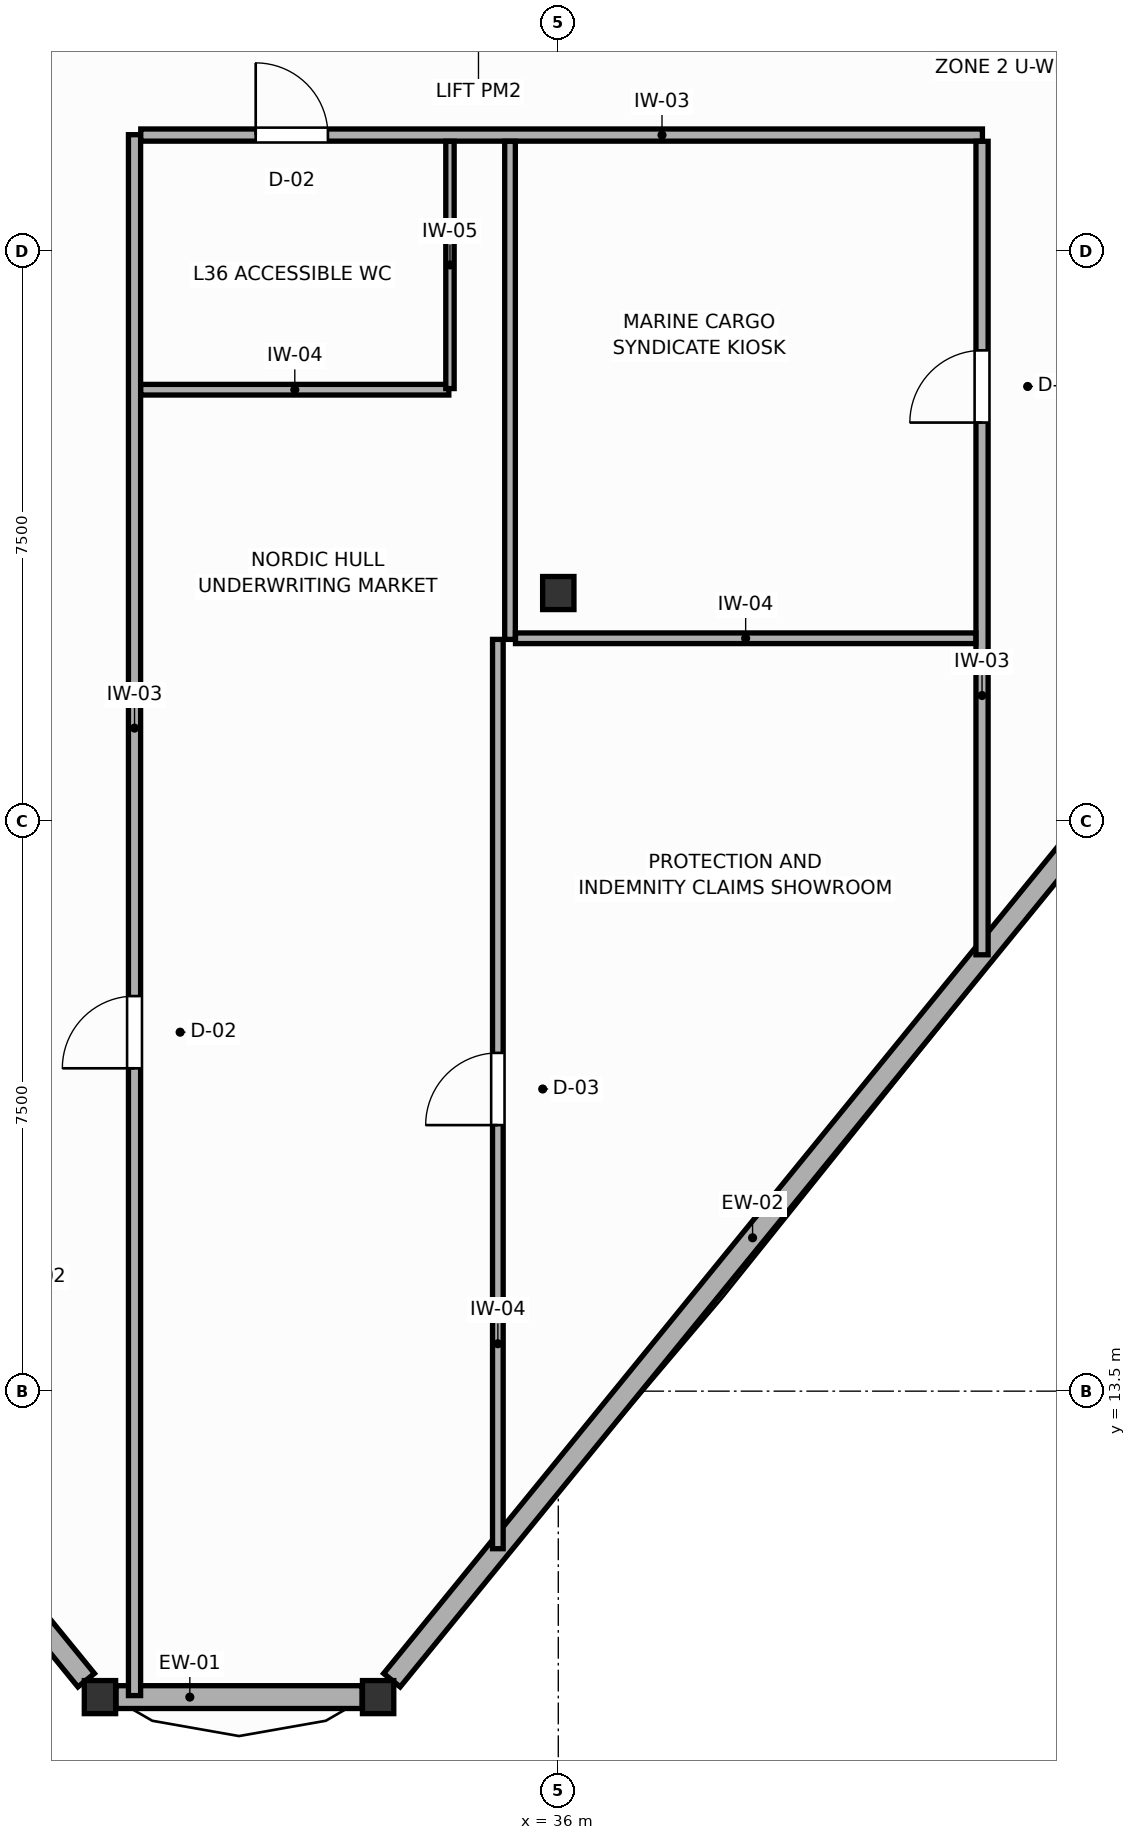
"""IFC4 building model, lengths in metres.
Left out: names, types, materials, properties, quantities, classifications, styles, units other than length and angle.
Written with IfcOpenShell. Run it as: python <this file> out.ifc"""

import sys

from ifc_helpers import new_model, si_unit, direction, frame, frame_2d, origin, origin_2d, place, context, subcontext, project, spatial, rectangle, i_section, extrude, source, transform, mapped, element, fill, save


model = new_model("IFC4")
c1 = context("Model", 3, precision=1e-05, world=origin(), true_north=direction((0.0, 1.0)))
c2 = subcontext(c1, "Body", "Model", "MODEL_VIEW")
j1 = project(units=[si_unit("LENGTHUNIT", "METRE"), si_unit("PLANEANGLEUNIT", "RADIAN")], contexts=[c1])
p1 = place(None, origin())
s1 = spatial("IfcSite", under=j1, at=p1, CompositionType="ELEMENT")
p2 = place(p1, origin())
s2 = spatial("IfcBuilding", under=s1, at=p2, CompositionType="ELEMENT")
p3 = place(p2, frame((0.0, 0.0, 143.4)))
s3 = spatial("IfcBuildingStorey", under=s2, at=p3, CompositionType="ELEMENT", Elevation=143.4)
m1 = source(origin(), c2, "Body", "SweptSolid", [
    extrude(i_section(OverallWidth=0.412, OverallDepth=0.435, WebThickness=0.033, FlangeThickness=0.053, FilletRadius=0.015, at=origin_2d()), origin(), (0.0, 0.0, 1.0), 3.6),
])
for number, where, z_axis, x_axis in (
    (1, (36.0, 24.0, 0.0), (0.0, 0.0, 1.0), (1.0, 0.0, 0.0)),
    (2, (29.97, 9.475, 0.0), (0.0, 0.0, 1.0), (1.0, 0.0, 0.0)),
    (3, (33.63, 9.475, 0.0), (0.0, 0.0, 1.0), (1.0, 0.0, 0.0)),
):
    element("IfcColumn", number, at=place(p3, frame(where, z_axis=z_axis, x_axis=x_axis)), inside=s3, PredefinedType="COLUMN", context=c2, shape_type="MappedRepresentation", body=[
        mapped(m1, transform((0.0, 0.0, 0.0), scale=1.0)),
    ])
p4 = place(p3, frame((20.299, 21.338, 0.0), z_axis=(0.0, 0.0, 1.0), x_axis=(0.631872666528, -0.775072211665, 0.0)))
e4 = element("IfcWall", 4, at=p4, inside=s3, PredefinedType="SOLIDWALL", context=c2, shape_type="SweptSolid", body=[
    extrude(rectangle(XDim=15.019, YDim=0.28, at=frame_2d((7.509, 0.0))), origin(), (0.0, 0.0, 1.0), 1.87),
])
p5 = place(p3, frame((30.181, 9.475, 0.0), z_axis=(0.0, 0.0, 1.0), x_axis=(1.0, 0.0, 0.0)))
e5 = element("IfcWall", 5, at=p5, inside=s3, PredefinedType="SOLIDWALL", context=c2, shape_type="SweptSolid", body=[
    extrude(rectangle(XDim=3.237, YDim=0.3, at=frame_2d((1.619, 0.0))), origin(), (0.0, 0.0, 1.0), 1.87),
])
p6 = place(p3, frame((33.811, 9.698, 0.0), z_axis=(0.0, 0.0, 1.0), x_axis=(0.631882431987, 0.775064250334, 0.0)))
e6 = element("IfcWall", 6, at=p6, inside=s3, PredefinedType="SOLIDWALL", context=c2, shape_type="SweptSolid", body=[
    extrude(rectangle(XDim=15.019, YDim=0.28, at=frame_2d((7.509, 0.0))), origin(), (0.0, 0.0, 1.0), 1.87),
])
p7 = place(p3, frame((30.425, 9.495, 0.0), z_axis=(0.0, 0.0, 1.0), x_axis=(0.0, 1.0, 0.0)))
e7 = element("IfcWall", 7, at=p7, inside=s3, PredefinedType="PARTITIONING", context=c2, shape_type="SweptSolid", body=[
    extrude(rectangle(XDim=20.535, YDim=0.16, at=frame_2d((10.268, 0.0))), origin(), (0.0, 0.0, 1.0), 3.4),
])
p8 = place(p7, frame((8.252, 0.0, 0.0)))
e8 = element("IfcOpeningElement", 8, at=p8, cuts=e7, PredefinedType="OPENING", context=c2, shape_type="SweptSolid", body=[
    extrude(rectangle(XDim=0.95, YDim=2.05, at=frame_2d((0.475, 1.025))), frame((0.0, 0.09, 0.0), z_axis=(0.0, -1.0, 0.0), x_axis=(1.0, 0.0, 0.0)), (0.0, 0.0, 1.0), 0.18),
])
p9 = place(p3, frame((30.507, 30.025, 0.0), z_axis=(0.0, 0.0, 1.0), x_axis=(1.0, 0.0, 0.0)))
e9 = element("IfcWall", 9, at=p9, inside=s3, PredefinedType="PARTITIONING", context=c2, shape_type="SweptSolid", body=[
    extrude(rectangle(XDim=11.073, YDim=0.16, at=frame_2d((5.537, 0.0))), origin(), (0.0, 0.0, 1.0), 3.4),
])
p10 = place(p9, frame((1.512, 0.0, 0.0)))
e10 = element("IfcOpeningElement", 10, at=p10, cuts=e9, PredefinedType="OPENING", context=c2, shape_type="SweptSolid", body=[
    extrude(rectangle(XDim=0.95, YDim=2.05, at=frame_2d((0.475, 1.025))), frame((0.0, 0.09, 0.0), z_axis=(0.0, -1.0, 0.0), x_axis=(1.0, 0.0, 0.0)), (0.0, 0.0, 1.0), 0.18),
])
p11 = place(p3, frame((41.575, 19.241, 0.0), z_axis=(0.0, 0.0, 1.0), x_axis=(0.0, 1.0, 0.0)))
e11 = element("IfcWall", 11, at=p11, inside=s3, PredefinedType="PARTITIONING", context=c2, shape_type="SweptSolid", body=[
    extrude(rectangle(XDim=10.702, YDim=0.16, at=frame_2d((5.351, 0.0))), origin(), (0.0, 0.0, 1.0), 3.4),
])
p12 = place(p11, frame((7.002, 0.0, 0.0)))
e12 = element("IfcOpeningElement", 12, at=p12, cuts=e11, PredefinedType="OPENING", context=c2, shape_type="SweptSolid", body=[
    extrude(rectangle(XDim=0.95, YDim=2.05, at=frame_2d((0.475, 1.025))), frame((0.0, 0.09, 0.0), z_axis=(0.0, -1.0, 0.0), x_axis=(1.0, 0.0, 0.0)), (0.0, 0.0, 1.0), 0.18),
])
p13 = place(p3, frame((35.205, 11.427, 0.0), z_axis=(0.0, 0.0, 1.0), x_axis=(0.0, 1.0, 0.0)))
e13 = element("IfcWall", 13, at=p13, inside=s3, PredefinedType="PARTITIONING", context=c2, shape_type="SweptSolid", body=[
    extrude(rectangle(XDim=11.963, YDim=0.14, at=frame_2d((5.981, 0.0))), origin(), (0.0, 0.0, 1.0), 3.4),
])
p14 = place(p13, frame((5.573, 0.0, 0.0)))
e14 = element("IfcOpeningElement", 14, at=p14, cuts=e13, PredefinedType="OPENING", context=c2, shape_type="SweptSolid", body=[
    extrude(rectangle(XDim=0.95, YDim=2.05, at=frame_2d((0.475, 1.025))), frame((0.0, 0.08, 0.0), z_axis=(0.0, -1.0, 0.0), x_axis=(1.0, 0.0, 0.0)), (0.0, 0.0, 1.0), 0.16),
])
p15 = place(p3, frame((35.365, 23.39, 0.0), z_axis=(0.0, 0.0, 1.0), x_axis=(0.0, 1.0, 0.0)))
e15 = element("IfcWall", 15, at=p15, inside=s3, PredefinedType="PARTITIONING", context=c2, shape_type="SweptSolid", body=[
    extrude(rectangle(XDim=6.553, YDim=0.14, at=frame_2d((3.277, 0.0))), origin(), (0.0, 0.0, 1.0), 3.4),
])
p16 = place(p3, frame((35.437, 23.405, 0.0), z_axis=(0.0, 0.0, 1.0), x_axis=(1.0, 0.0, 0.0)))
e16 = element("IfcWall", 16, at=p16, inside=s3, PredefinedType="PARTITIONING", context=c2, shape_type="SweptSolid", body=[
    extrude(rectangle(XDim=6.056, YDim=0.14, at=frame_2d((3.028, 0.0))), origin(), (0.0, 0.0, 1.0), 3.4),
])
p17 = place(p3, frame((30.507, 26.675, 0.0), z_axis=(0.0, 0.0, 1.0), x_axis=(1.0, 0.0, 0.0)))
e17 = element("IfcWall", 17, at=p17, inside=s3, PredefinedType="PARTITIONING", context=c2, shape_type="SweptSolid", body=[
    extrude(rectangle(XDim=4.053, YDim=0.14, at=frame_2d((2.026, 0.0))), origin(), (0.0, 0.0, 1.0), 3.4),
])
p18 = place(p3, frame((34.575, 26.69, 0.0), z_axis=(0.0, 0.0, 1.0), x_axis=(0.0, 1.0, 0.0)))
e18 = element("IfcWall", 18, at=p18, inside=s3, PredefinedType="MOVABLE", context=c2, shape_type="SweptSolid", body=[
    extrude(rectangle(XDim=3.253, YDim=0.11, at=frame_2d((1.626, 0.0))), origin(), (0.0, 0.0, 1.0), 3.4),
])
p19 = place(p8, origin())
e19 = element("IfcDoor", 19, at=p19, inside=s3, OperationType="SINGLE_SWING_LEFT", PredefinedType="DOOR", context=c2, shape_type="SweptSolid", body=[
    extrude(rectangle(XDim=0.95, YDim=2.05, at=frame_2d((0.475, 1.025))), frame((0.0, 0.025, 0.0), z_axis=(0.0, -1.0, 0.0), x_axis=(1.0, 0.0, 0.0)), (0.0, 0.0, 1.0), 0.05),
])
fill(e8, e19)
p20 = place(p10, origin())
e20 = element("IfcDoor", 20, at=p20, inside=s3, OperationType="SINGLE_SWING_LEFT", PredefinedType="DOOR", context=c2, shape_type="SweptSolid", body=[
    extrude(rectangle(XDim=0.95, YDim=2.05, at=frame_2d((0.475, 1.025))), frame((0.0, 0.025, 0.0), z_axis=(0.0, -1.0, 0.0), x_axis=(1.0, 0.0, 0.0)), (0.0, 0.0, 1.0), 0.05),
])
fill(e10, e20)
p21 = place(p12, origin())
e21 = element("IfcDoor", 21, at=p21, inside=s3, OperationType="SINGLE_SWING_LEFT", PredefinedType="DOOR", context=c2, shape_type="SweptSolid", body=[
    extrude(rectangle(XDim=0.95, YDim=2.05, at=frame_2d((0.475, 1.025))), frame((0.0, 0.025, 0.0), z_axis=(0.0, -1.0, 0.0), x_axis=(1.0, 0.0, 0.0)), (0.0, 0.0, 1.0), 0.05),
])
fill(e12, e21)
p22 = place(p14, origin())
e22 = element("IfcDoor", 22, at=p22, inside=s3, OperationType="SINGLE_SWING_LEFT", PredefinedType="DOOR", context=c2, shape_type="SweptSolid", body=[
    extrude(rectangle(XDim=0.95, YDim=2.05, at=frame_2d((0.475, 1.025))), frame((0.0, 0.025, 0.0), z_axis=(0.0, -1.0, 0.0), x_axis=(1.0, 0.0, 0.0)), (0.0, 0.0, 1.0), 0.05),
])
fill(e14, e22)
save(model, sys.argv[1])
